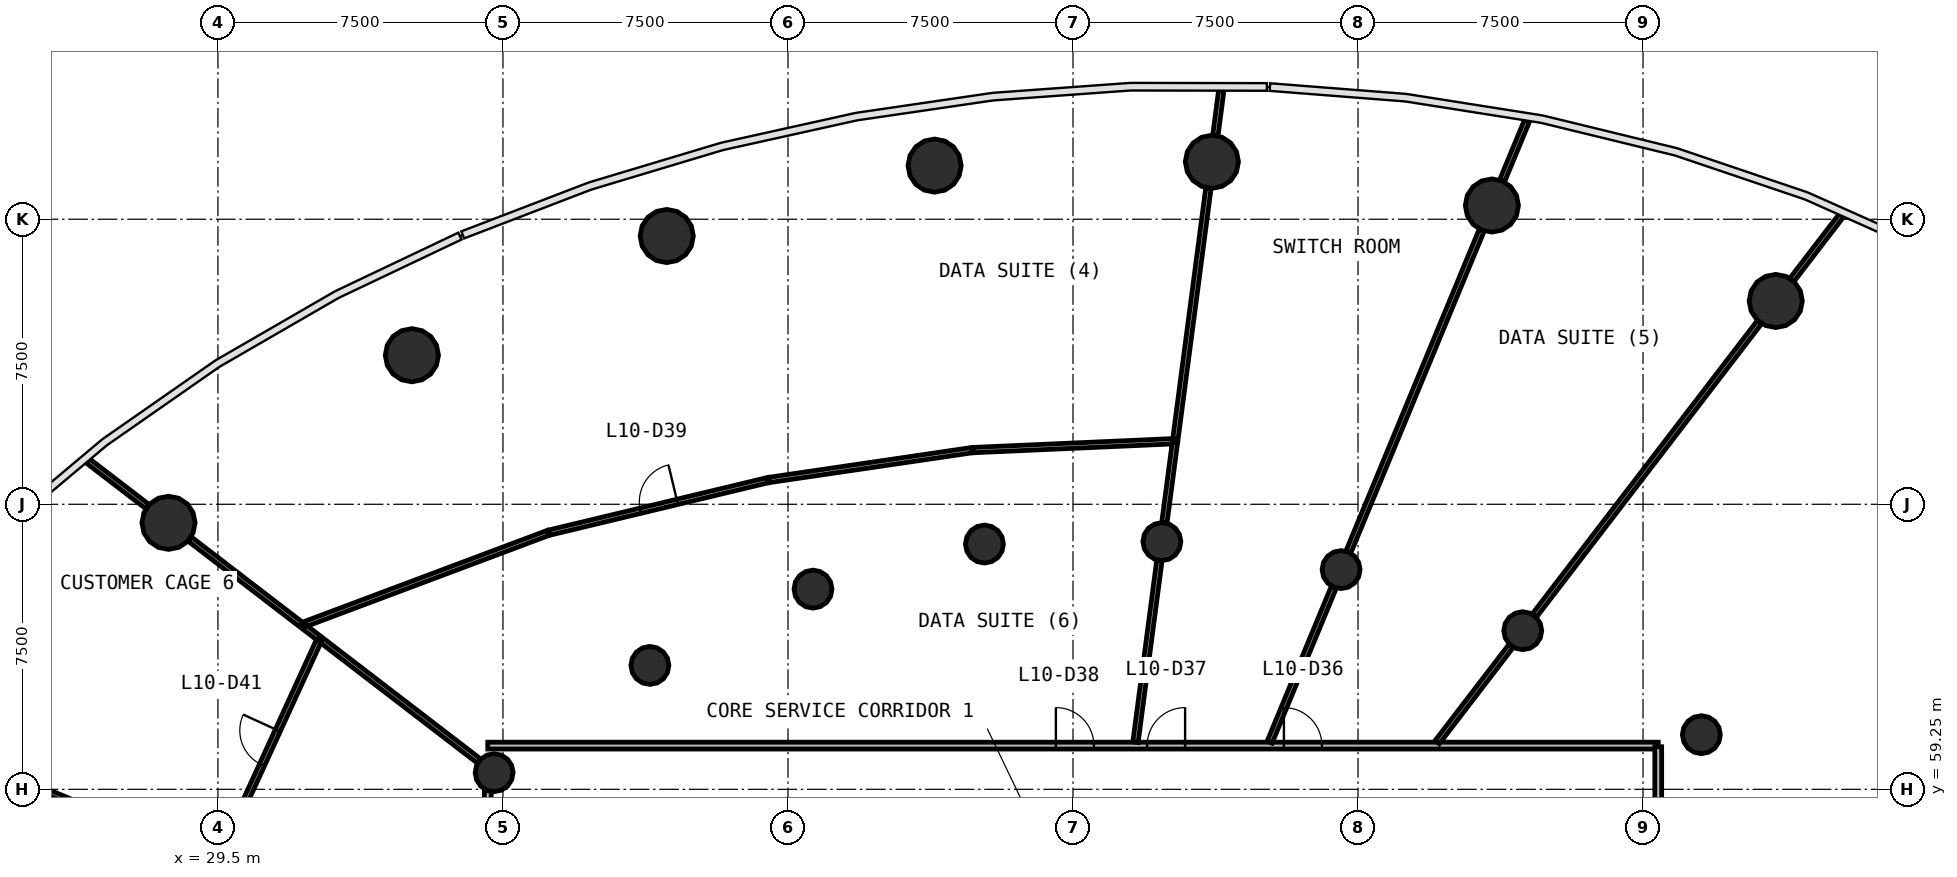
"""IFC4 building model, lengths in metres.
Left out: names, types, materials, properties, quantities, classifications, styles, units other than length and angle.
Written with IfcOpenShell. Run it as: python <this file> out.ifc"""

import sys

from ifc_helpers import new_model, si_unit, direction, frame, frame_2d, origin, origin_2d, place, context, subcontext, project, spatial, rectangle, circle, extrude, source, transform, mapped, element, fill, save


model = new_model("IFC4")
c1 = context("Model", 3, precision=1e-05, world=origin(), true_north=direction((0.0, 1.0)))
c2 = subcontext(c1, "Body", "Model", "MODEL_VIEW")
j1 = project(units=[si_unit("LENGTHUNIT", "METRE"), si_unit("PLANEANGLEUNIT", "RADIAN")], contexts=[c1])
p1 = place(None, origin())
s1 = spatial("IfcSite", under=j1, at=p1, CompositionType="ELEMENT")
p2 = place(p1, origin())
s2 = spatial("IfcBuilding", under=s1, at=p2, CompositionType="ELEMENT")
p3 = place(p2, frame((0.0, 0.0, 44.6)))
s3 = spatial("IfcBuildingStorey", under=s2, at=p3, CompositionType="ELEMENT", Elevation=44.6)
m1 = source(origin(), c2, "Body", "SweptSolid", [
    extrude(circle(Radius=0.7, at=origin_2d()), origin(), (0.0, 0.0, 1.0), 4.4),
])
for number, where, z_axis, x_axis in (
    (1, (70.492, 72.1, 0.0), (0.0, 0.0, 1.0), (1.0, 0.0, 0.0)),
    (2, (63.023, 74.611, 0.0), (0.0, 0.0, 1.0), (1.0, 0.0, 0.0)),
    (3, (55.655, 75.761, 0.0), (0.0, 0.0, 1.0), (1.0, 0.0, 0.0)),
    (4, (48.358, 75.661, 0.0), (0.0, 0.0, 1.0), (1.0, 0.0, 0.0)),
    (5, (41.31, 73.809, 0.0), (0.0, 0.0, 1.0), (1.0, 0.0, 0.0)),
    (6, (34.604, 70.672, 0.0), (0.0, 0.0, 1.0), (1.0, 0.0, 0.0)),
    (7, (28.199, 66.263, 0.0), (0.0, 0.0, 1.0), (1.0, 0.0, 0.0)),
):
    element("IfcColumn", number, at=place(p3, frame(where, z_axis=z_axis, x_axis=x_axis)), inside=s3, PredefinedType="COLUMN", context=c2, shape_type="MappedRepresentation", body=[
        mapped(m1, transform((0.0, 0.0, 0.0), scale=1.0)),
    ])
m2 = source(origin(), c2, "Body", "SweptSolid", [
    extrude(circle(Radius=0.5, at=origin_2d()), origin(), (0.0, 0.0, 1.0), 4.4),
])
for number, where, z_axis, x_axis in (
    (8, (68.535, 60.688, 0.0), (0.0, 0.0, 1.0), (1.0, 0.0, 0.0)),
    (9, (63.835, 63.424, 0.0), (0.0, 0.0, 1.0), (1.0, 0.0, 0.0)),
    (10, (59.055, 65.031, 0.0), (0.0, 0.0, 1.0), (1.0, 0.0, 0.0)),
    (11, (54.339, 65.767, 0.0), (0.0, 0.0, 1.0), (1.0, 0.0, 0.0)),
    (12, (49.669, 65.703, 0.0), (0.0, 0.0, 1.0), (1.0, 0.0, 0.0)),
    (13, (45.158, 64.518, 0.0), (0.0, 0.0, 1.0), (1.0, 0.0, 0.0)),
    (14, (40.866, 62.51, 0.0), (0.0, 0.0, 1.0), (1.0, 0.0, 0.0)),
    (15, (36.768, 59.688, 0.0), (0.0, 0.0, 1.0), (1.0, 0.0, 0.0)),
):
    element("IfcColumn", number, at=place(p3, frame(where, z_axis=z_axis, x_axis=x_axis)), inside=s3, PredefinedType="COLUMN", context=c2, shape_type="MappedRepresentation", body=[
        mapped(m2, transform((0.0, 0.0, 0.0), scale=1.0)),
    ])
p4 = place(p3, frame((36.6, 60.4, 0.0), z_axis=(0.0, 0.0, 1.0), x_axis=(1.0, 0.0, 0.0)))
e16 = element("IfcWall", 16, at=p4, inside=s3, PredefinedType="PARTITIONING", context=c2, shape_type="SweptSolid", body=[
    extrude(rectangle(XDim=30.8, YDim=0.18, at=frame_2d((15.4, 0.0))), origin(), (0.0, 0.0, 1.0), 3.05),
])
p5 = place(p4, frame((20.95, 0.0, 0.0)))
e17 = element("IfcOpeningElement", 17, at=p5, cuts=e16, PredefinedType="OPENING", context=c2, shape_type="SweptSolid", body=[
    extrude(rectangle(XDim=1.0, YDim=2.1, at=frame_2d((0.5, 1.05))), frame((0.0, 0.1, 0.0), z_axis=(0.0, -1.0, 0.0), x_axis=(1.0, 0.0, 0.0)), (0.0, 0.0, 1.0), 0.2),
])
p6 = place(p4, frame((17.35, 0.0, 0.0)))
e18 = element("IfcOpeningElement", 18, at=p6, cuts=e16, PredefinedType="OPENING", context=c2, shape_type="SweptSolid", body=[
    extrude(rectangle(XDim=1.0, YDim=2.1, at=frame_2d((0.5, 1.05))), frame((0.0, 0.1, 0.0), z_axis=(0.0, -1.0, 0.0), x_axis=(1.0, 0.0, 0.0)), (0.0, 0.0, 1.0), 0.2),
])
p7 = place(p4, frame((14.95, 0.0, 0.0)))
e19 = element("IfcOpeningElement", 19, at=p7, cuts=e16, PredefinedType="OPENING", context=c2, shape_type="SweptSolid", body=[
    extrude(rectangle(XDim=1.0, YDim=2.1, at=frame_2d((0.5, 1.05))), frame((0.0, 0.1, 0.0), z_axis=(0.0, -1.0, 0.0), x_axis=(1.0, 0.0, 0.0)), (0.0, 0.0, 1.0), 0.2),
])
p8 = place(p3, frame((67.4, 60.37, 0.0), z_axis=(0.0, 0.0, 1.0), x_axis=(0.0, -1.0, 0.0)))
e20 = element("IfcWall", 20, at=p8, inside=s3, PredefinedType="PARTITIONING", context=c2, shape_type="SweptSolid", body=[
    extrude(rectangle(XDim=23.583, YDim=0.18, at=frame_2d((11.791, 0.0))), origin(), (0.0, 0.0, 1.0), 3.05),
])
p9 = place(p8, frame((11.333, 0.0, 0.0)))
e21 = element("IfcOpeningElement", 21, at=p9, cuts=e20, PredefinedType="OPENING", context=c2, shape_type="SweptSolid", body=[
    extrude(rectangle(XDim=1.0, YDim=2.1, at=frame_2d((0.5, 1.05))), frame((0.0, 0.1, 0.0), z_axis=(0.0, -1.0, 0.0), x_axis=(1.0, 0.0, 0.0)), (0.0, 0.0, 1.0), 0.2),
])
p10 = place(p8, frame((9.133, 0.0, 0.0)))
e22 = element("IfcOpeningElement", 22, at=p10, cuts=e20, PredefinedType="OPENING", context=c2, shape_type="SweptSolid", body=[
    extrude(rectangle(XDim=1.0, YDim=2.1, at=frame_2d((0.5, 1.05))), frame((0.0, 0.1, 0.0), z_axis=(0.0, -1.0, 0.0), x_axis=(1.0, 0.0, 0.0)), (0.0, 0.0, 1.0), 0.2),
])
p11 = place(p3, frame((36.6, 35.63, 0.0), z_axis=(0.0, 0.0, 1.0), x_axis=(0.0, 1.0, 0.0)))
e23 = element("IfcWall", 23, at=p11, inside=s3, PredefinedType="PARTITIONING", context=c2, shape_type="SweptSolid", body=[
    extrude(rectangle(XDim=23.583, YDim=0.18, at=frame_2d((11.791, 0.0))), origin(), (0.0, 0.0, 1.0), 3.05),
])
p12 = place(p11, frame((11.333, 0.0, 0.0)))
e24 = element("IfcOpeningElement", 24, at=p12, cuts=e23, PredefinedType="OPENING", context=c2, shape_type="SweptSolid", body=[
    extrude(rectangle(XDim=1.0, YDim=2.1, at=frame_2d((0.5, 1.05))), frame((0.0, 0.1, 0.0), z_axis=(0.0, -1.0, 0.0), x_axis=(1.0, 0.0, 0.0)), (0.0, 0.0, 1.0), 0.2),
])
p13 = place(p11, frame((4.532, 0.0, 0.0)))
e25 = element("IfcOpeningElement", 25, at=p13, cuts=e23, PredefinedType="OPENING", context=c2, shape_type="SweptSolid", body=[
    extrude(rectangle(XDim=1.0, YDim=2.1, at=frame_2d((0.5, 1.05))), frame((0.0, 0.1, 0.0), z_axis=(0.0, -1.0, 0.0), x_axis=(1.0, 0.0, 0.0)), (0.0, 0.0, 1.0), 0.2),
])
p14 = place(p3, frame((64.142, 63.824, 0.0), z_axis=(0.0, 0.0, 1.0), x_axis=(0.608770295053, 0.793346537057, 0.0)))
e26 = element("IfcWall", 26, at=p14, inside=s3, PredefinedType="PARTITIONING", context=c2, shape_type="SweptSolid", body=[
    extrude(rectangle(XDim=9.727, YDim=0.14, at=frame_2d((4.864, 0.0))), origin(), (0.0, 0.0, 1.0), 3.05),
])
p15 = place(p3, frame((59.248, 65.498, 0.0), z_axis=(0.0, 0.0, 1.0), x_axis=(0.382672728165, 0.923883966264, 0.0)))
e27 = element("IfcWall", 27, at=p15, inside=s3, PredefinedType="PARTITIONING", context=c2, shape_type="SweptSolid", body=[
    extrude(rectangle(XDim=9.16, YDim=0.14, at=frame_2d((4.58, 0.0))), origin(), (0.0, 0.0, 1.0), 3.05),
])
p16 = place(p3, frame((29.484, 57.326, 0.0), z_axis=(0.0, 0.0, 1.0), x_axis=(-0.923878476662, 0.3826859814, 0.0)))
e28 = element("IfcWall", 28, at=p16, inside=s3, PredefinedType="PARTITIONING", context=c2, shape_type="SweptSolid", body=[
    extrude(rectangle(XDim=7.011, YDim=0.14, at=frame_2d((3.506, 0.0))), origin(), (0.0, 0.0, 1.0), 3.05),
])
p17 = place(p3, frame((38.19, 65.998, 0.0), z_axis=(0.0, 0.0, 1.0), x_axis=(-0.936297270661, -0.35120851492, 0.0)))
e29 = element("IfcWall", 29, at=p17, inside=s3, PredefinedType="PARTITIONING", context=c2, shape_type="SweptSolid", body=[
    extrude(rectangle(XDim=6.919, YDim=0.14, at=frame_2d((3.459, 0.0))), origin(), (0.0, 0.0, 1.0), 3.05),
])
p18 = place(p3, frame((54.687, 68.411, 0.0), z_axis=(0.0, 0.0, 1.0), x_axis=(0.130547690074, 0.99144203089, 0.0)))
e30 = element("IfcWall", 30, at=p18, inside=s3, PredefinedType="PARTITIONING", context=c2, shape_type="SweptSolid", body=[
    extrude(rectangle(XDim=6.71, YDim=0.14, at=frame_2d((3.355, 0.0))), origin(), (0.0, 0.0, 1.0), 3.05),
])
p19 = place(p3, frame((29.497, 57.354, 0.0), z_axis=(0.0, 0.0, 1.0), x_axis=(0.416308805512, 0.909223283057, 0.0)))
e31 = element("IfcWall", 31, at=p19, inside=s3, PredefinedType="PARTITIONING", context=c2, shape_type="SweptSolid", body=[
    extrude(rectangle(XDim=6.441, YDim=0.14, at=frame_2d((3.22, 0.0))), origin(), (0.0, 0.0, 1.0), 3.05),
])
p20 = place(p19, frame((2.791, 0.0, 0.0)))
e32 = element("IfcOpeningElement", 32, at=p20, cuts=e31, PredefinedType="OPENING", context=c2, shape_type="SweptSolid", body=[
    extrude(rectangle(XDim=1.0, YDim=2.1, at=frame_2d((0.5, 1.05))), frame((0.0, 0.08, 0.0), z_axis=(0.0, -1.0, 0.0), x_axis=(1.0, 0.0, 0.0)), (0.0, 0.0, 1.0), 0.16),
])
p21 = place(p3, frame((38.219, 66.005, 0.0), z_axis=(0.0, 0.0, 1.0), x_axis=(0.972386552633, 0.233376074734, 0.0)))
e33 = element("IfcWall", 33, at=p21, inside=s3, PredefinedType="PARTITIONING", context=c2, shape_type="SweptSolid", body=[
    extrude(rectangle(XDim=5.915, YDim=0.14, at=frame_2d((2.958, 0.0))), origin(), (0.0, 0.0, 1.0), 3.05),
])
p22 = place(p21, frame((2.465, 0.0, 0.0)))
e34 = element("IfcOpeningElement", 34, at=p22, cuts=e33, PredefinedType="OPENING", context=c2, shape_type="SweptSolid", body=[
    extrude(rectangle(XDim=1.0, YDim=2.1, at=frame_2d((0.5, 1.05))), frame((0.0, 0.08, 0.0), z_axis=(0.0, -1.0, 0.0), x_axis=(1.0, 0.0, 0.0)), (0.0, 0.0, 1.0), 0.16),
])
p23 = place(p3, frame((49.344, 68.175, 0.0), z_axis=(0.0, 0.0, 1.0), x_axis=(-0.989377499091, -0.145369062366, 0.0)))
e35 = element("IfcWall", 35, at=p23, inside=s3, PredefinedType="PARTITIONING", context=c2, shape_type="SweptSolid", body=[
    extrude(rectangle(XDim=5.401, YDim=0.14, at=frame_2d((2.701, 0.0))), origin(), (0.0, 0.0, 1.0), 3.05),
])
p24 = place(p3, frame((54.657, 68.409, 0.0), z_axis=(0.0, 0.0, 1.0), x_axis=(-0.999023656057, -0.044178440869, 0.0)))
e36 = element("IfcWall", 36, at=p24, inside=s3, PredefinedType="PARTITIONING", context=c2, shape_type="SweptSolid", body=[
    extrude(rectangle(XDim=5.289, YDim=0.14, at=frame_2d((2.644, 0.0))), origin(), (0.0, 0.0, 1.0), 3.05),
])
p25 = place(p3, frame((36.367, 59.995, 0.0), z_axis=(0.0, 0.0, 1.0), x_axis=(-0.793353550187, 0.608761155467, 0.0)))
e37 = element("IfcWall", 37, at=p25, inside=s3, PredefinedType="PARTITIONING", context=c2, shape_type="SweptSolid", body=[
    extrude(rectangle(XDim=5.208, YDim=0.14, at=frame_2d((2.604, 0.0))), origin(), (0.0, 0.0, 1.0), 3.05),
])
p26 = place(p3, frame((53.644, 60.49, 0.0), z_axis=(0.0, 0.0, 1.0), x_axis=(0.130523979823, 0.991445152639, 0.0)))
e38 = element("IfcWall", 38, at=p26, inside=s3, PredefinedType="PARTITIONING", context=c2, shape_type="SweptSolid", body=[
    extrude(rectangle(XDim=4.818, YDim=0.14, at=frame_2d((2.409, 0.0))), origin(), (0.0, 0.0, 1.0), 3.05),
])
p27 = place(p3, frame((57.174, 60.49, 0.0), z_axis=(0.0, 0.0, 1.0), x_axis=(0.382672831764, 0.923883923353, 0.0)))
e39 = element("IfcWall", 39, at=p27, inside=s3, PredefinedType="PARTITIONING", context=c2, shape_type="SweptSolid", body=[
    extrude(rectangle(XDim=4.41, YDim=0.14, at=frame_2d((2.205, 0.0))), origin(), (0.0, 0.0, 1.0), 3.05),
])
p28 = place(p3, frame((31.688, 63.586, 0.0), z_axis=(0.0, 0.0, 1.0), x_axis=(-0.793375408023, 0.608732668701, 0.0)))
e40 = element("IfcWall", 40, at=p28, inside=s3, PredefinedType="PARTITIONING", context=c2, shape_type="SweptSolid", body=[
    extrude(rectangle(XDim=3.693, YDim=0.14, at=frame_2d((1.847, 0.0))), origin(), (0.0, 0.0, 1.0), 3.05),
])
p29 = place(p3, frame((61.584, 60.49, 0.0), z_axis=(0.0, 0.0, 1.0), x_axis=(0.60874605662, 0.793365135703, 0.0)))
e41 = element("IfcWall", 41, at=p29, inside=s3, PredefinedType="PARTITIONING", context=c2, shape_type="SweptSolid", body=[
    extrude(rectangle(XDim=3.194, YDim=0.14, at=frame_2d((1.597, 0.0))), origin(), (0.0, 0.0, 1.0), 3.05),
])
p30 = place(p3, frame((54.405, 66.267, 0.0), z_axis=(0.0, 0.0, 1.0), x_axis=(0.130430814721, 0.991457413393, 0.0)))
e42 = element("IfcWall", 42, at=p30, inside=s3, PredefinedType="PARTITIONING", context=c2, shape_type="SweptSolid", body=[
    extrude(rectangle(XDim=2.132, YDim=0.14, at=frame_2d((1.066, 0.0))), origin(), (0.0, 0.0, 1.0), 3.05),
])
p31 = place(p3, frame((70.921, 72.658, 0.0), z_axis=(0.0, 0.0, 1.0), x_axis=(0.608822106268, 0.793306777306, 0.0)))
e43 = element("IfcWall", 43, at=p31, inside=s3, PredefinedType="PARTITIONING", context=c2, shape_type="SweptSolid", body=[
    extrude(rectangle(XDim=2.152, YDim=0.14, at=frame_2d((1.076, 0.0))), origin(), (0.0, 0.0, 1.0), 3.05),
])
p32 = place(p3, frame((27.641, 66.691, 0.0), z_axis=(0.0, 0.0, 1.0), x_axis=(-0.793312100237, 0.608815170325, 0.0)))
e44 = element("IfcWall", 44, at=p32, inside=s3, PredefinedType="PARTITIONING", context=c2, shape_type="SweptSolid", body=[
    extrude(rectangle(XDim=1.977, YDim=0.14, at=frame_2d((0.989, 0.0))), origin(), (0.0, 0.0, 1.0), 3.05),
])
p33 = place(p3, frame((63.292, 75.263, 0.0), z_axis=(0.0, 0.0, 1.0), x_axis=(0.382632674553, 0.923900555452, 0.0)))
e45 = element("IfcWall", 45, at=p33, inside=s3, PredefinedType="PARTITIONING", context=c2, shape_type="SweptSolid", body=[
    extrude(rectangle(XDim=1.714, YDim=0.14, at=frame_2d((0.857, 0.0))), origin(), (0.0, 0.0, 1.0), 3.05),
])
p34 = place(p3, frame((55.747, 76.46, 0.0), z_axis=(0.0, 0.0, 1.0), x_axis=(0.130449264586, 0.991454986053, 0.0)))
e46 = element("IfcWall", 46, at=p34, inside=s3, PredefinedType="PARTITIONING", context=c2, shape_type="SweptSolid", body=[
    extrude(rectangle(XDim=1.203, YDim=0.14, at=frame_2d((0.602, 0.0))), origin(), (0.0, 0.0, 1.0), 3.05),
])
p35 = place(p3, frame((32.155, 63.228, 0.0), z_axis=(0.0, 0.0, 1.0), x_axis=(-0.793176766219, 0.608991475745, 0.0)))
e47 = element("IfcWall", 47, at=p35, inside=s3, PredefinedType="PARTITIONING", context=c2, shape_type="SweptSolid", body=[
    extrude(rectangle(XDim=0.476, YDim=0.14, at=frame_2d((0.238, 0.0))), origin(), (0.0, 0.0, 1.0), 3.05),
])
m3 = source(origin(), c2, "Body", "SweptSolid", [
    extrude(rectangle(XDim=1.0, YDim=2.1, at=frame_2d((0.5, 1.05))), frame((0.0, 0.025, 0.0), z_axis=(0.0, -1.0, 0.0), x_axis=(1.0, 0.0, 0.0)), (0.0, 0.0, 1.0), 0.05),
])
p36 = place(p5, origin())
e48 = element("IfcDoor", 48, at=p36, inside=s3, OperationType="SINGLE_SWING_LEFT", PredefinedType="DOOR", context=c2, shape_type="MappedRepresentation", body=[
    mapped(m3, transform((0.0, 0.0, 0.0), scale=1.0)),
])
fill(e17, e48)
p37 = place(p6, origin())
e49 = element("IfcDoor", 49, at=p37, inside=s3, OperationType="SINGLE_SWING_RIGHT", PredefinedType="DOOR", context=c2, shape_type="MappedRepresentation", body=[
    mapped(m3, transform((0.0, 0.0, 0.0), scale=1.0)),
])
fill(e18, e49)
p38 = place(p7, origin())
e50 = element("IfcDoor", 50, at=p38, inside=s3, OperationType="SINGLE_SWING_LEFT", PredefinedType="DOOR", context=c2, shape_type="MappedRepresentation", body=[
    mapped(m3, transform((0.0, 0.0, 0.0), scale=1.0)),
])
fill(e19, e50)
p39 = place(p22, origin())
e51 = element("IfcDoor", 51, at=p39, inside=s3, OperationType="SINGLE_SWING_RIGHT", PredefinedType="DOOR", context=c2, shape_type="MappedRepresentation", body=[
    mapped(m3, transform((0.0, 0.0, 0.0), scale=1.0)),
])
fill(e34, e51)
p40 = place(p20, origin())
e52 = element("IfcDoor", 52, at=p40, inside=s3, OperationType="SINGLE_SWING_RIGHT", PredefinedType="DOOR", context=c2, shape_type="MappedRepresentation", body=[
    mapped(m3, transform((0.0, 0.0, 0.0), scale=1.0)),
])
fill(e32, e52)
save(model, sys.argv[1])
